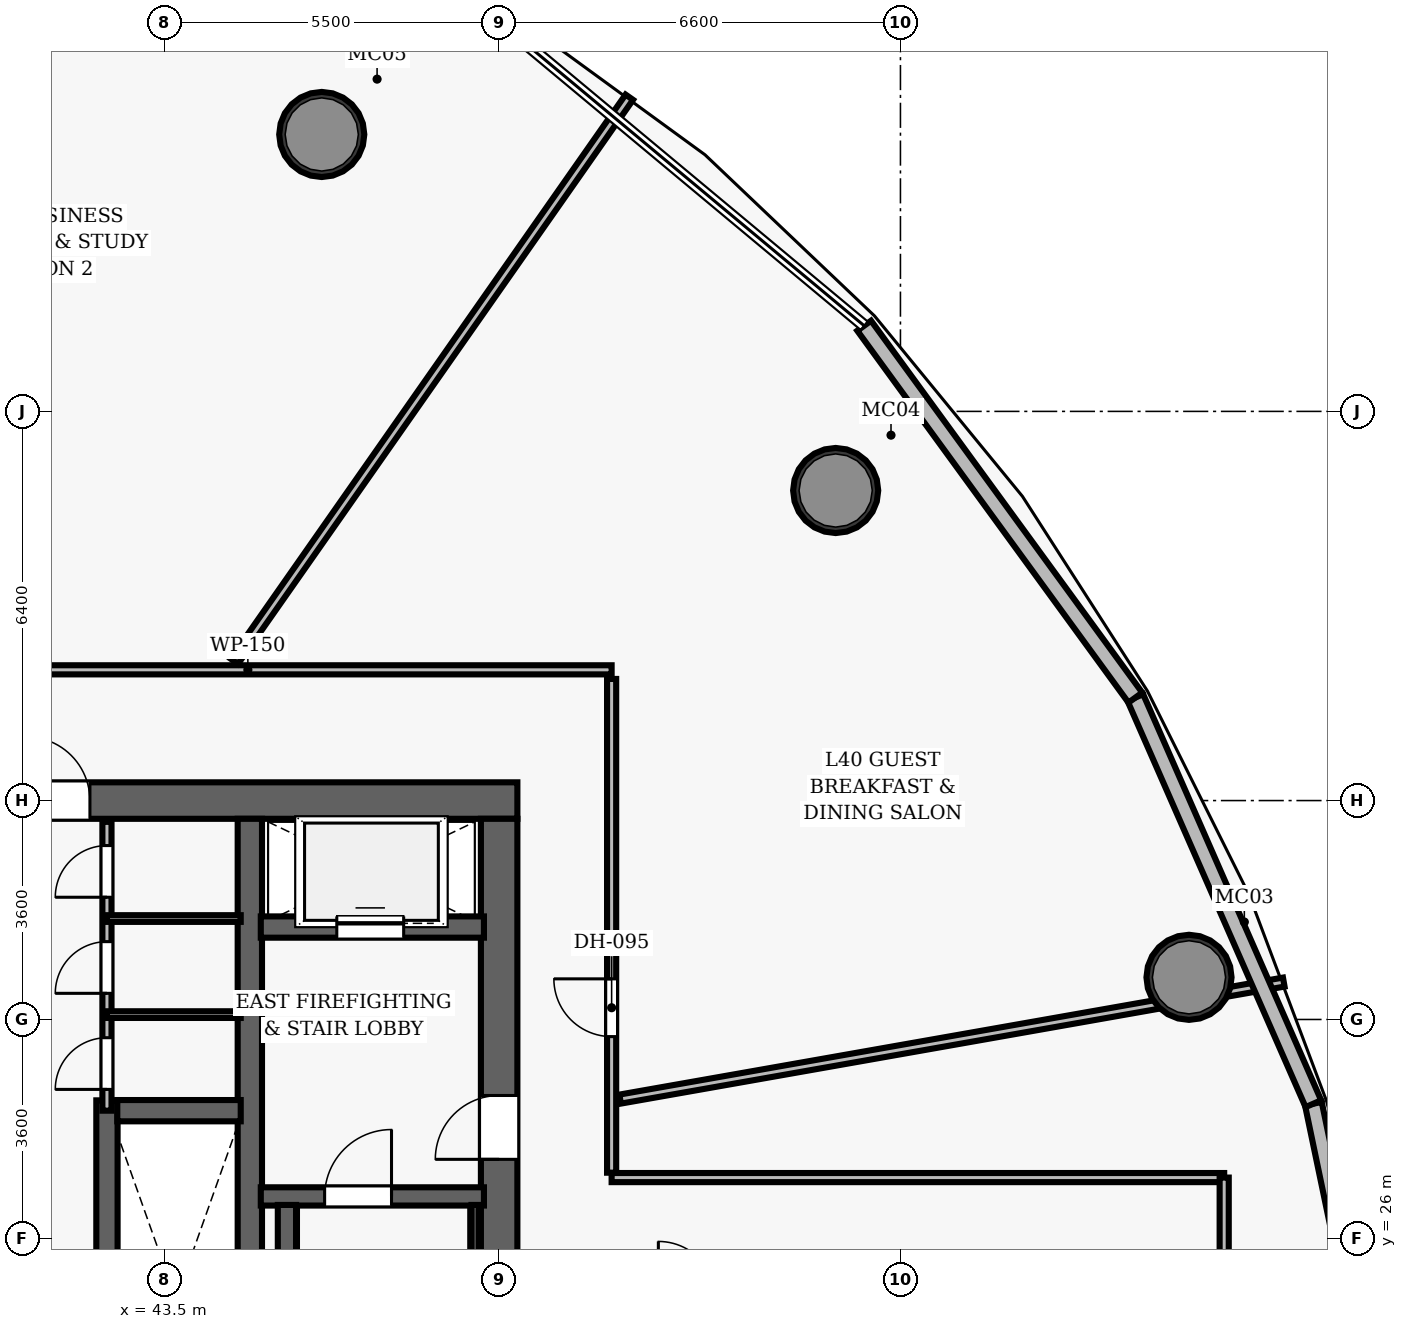
"""IFC4 building model, lengths in metres.
Left out: names, types, materials, properties, quantities, classifications, styles, units other than length and angle.
Written with IfcOpenShell. Run it as: python <this file> out.ifc"""

import sys

from ifc_helpers import new_model, si_unit, direction, frame, frame_2d, origin, origin_2d, place, context, subcontext, project, spatial, rectangle, hollow_circle, extrude, element, fill, save


model = new_model("IFC4")
c1 = context("Model", 3, precision=1e-05, world=origin(), true_north=direction((0.0, 1.0)))
c2 = subcontext(c1, "Body", "Model", "MODEL_VIEW")
j1 = project(units=[si_unit("LENGTHUNIT", "METRE"), si_unit("PLANEANGLEUNIT", "RADIAN")], contexts=[c1])
p1 = place(None, origin())
s1 = spatial("IfcSite", under=j1, at=p1, CompositionType="ELEMENT")
p2 = place(p1, origin())
s2 = spatial("IfcBuilding", under=s1, at=p2, CompositionType="ELEMENT")
p3 = place(p2, frame((0.0, 0.0, 158.8)))
s3 = spatial("IfcBuildingStorey", under=s2, at=p3, CompositionType="ELEMENT", Elevation=158.8)
p4 = place(p3, frame((26.7, 33.2, 0.0), z_axis=(0.0, 0.0, 1.0), x_axis=(1.0, 0.0, 0.0)))
e1 = element("IfcWall", 1, at=p4, inside=s3, PredefinedType="SHEAR", context=c2, shape_type="SweptSolid", body=[
    extrude(rectangle(XDim=22.6, YDim=0.6, at=frame_2d((11.3, 0.0))), origin(), (0.0, 0.0, 1.0), 3.5),
])
p5 = place(p4, frame((4.62, 0.0, 0.0)))
e2 = element("IfcOpeningElement", 2, at=p5, cuts=e1, PredefinedType="OPENING", context=c2, shape_type="SweptSolid", body=[
    extrude(rectangle(XDim=1.05, YDim=2.15, at=frame_2d((0.525, 1.075))), frame((0.0, 0.31, 0.0), z_axis=(0.0, -1.0, 0.0), x_axis=(1.0, 0.0, 0.0)), (0.0, 0.0, 1.0), 0.62),
])
p6 = place(p4, frame((14.52, 0.0, 0.0)))
e3 = element("IfcOpeningElement", 3, at=p6, cuts=e1, PredefinedType="OPENING", context=c2, shape_type="SweptSolid", body=[
    extrude(rectangle(XDim=1.05, YDim=2.15, at=frame_2d((0.525, 1.075))), frame((0.0, 0.31, 0.0), z_axis=(0.0, -1.0, 0.0), x_axis=(1.0, 0.0, 0.0)), (0.0, 0.0, 1.0), 0.62),
])
p7 = place(p3, frame((49.0, 19.1, 0.0), z_axis=(0.0, 0.0, 1.0), x_axis=(0.0, 1.0, 0.0)))
e4 = element("IfcWall", 4, at=p7, inside=s3, PredefinedType="SHEAR", context=c2, shape_type="SweptSolid", body=[
    extrude(rectangle(XDim=13.8, YDim=0.6, at=frame_2d((6.9, 0.0))), origin(), (0.0, 0.0, 1.0), 3.5),
])
p8 = place(p7, frame((8.2, 0.0, 0.0)))
e5 = element("IfcOpeningElement", 5, at=p8, cuts=e4, PredefinedType="OPENING", context=c2, shape_type="SweptSolid", body=[
    extrude(rectangle(XDim=1.05, YDim=2.15, at=frame_2d((0.525, 1.075))), frame((0.0, 0.31, 0.0), z_axis=(0.0, -1.0, 0.0), x_axis=(1.0, 0.0, 0.0)), (0.0, 0.0, 1.0), 0.62),
])
p9 = place(p3, frame((44.9, 19.1, 0.0), z_axis=(0.0, 0.0, 1.0), x_axis=(0.0, 1.0, 0.0)))
e6 = element("IfcWall", 6, at=p9, inside=s3, PredefinedType="SHEAR", context=c2, shape_type="SweptSolid", body=[
    extrude(rectangle(XDim=13.8, YDim=0.4, at=frame_2d((6.9, 0.0))), origin(), (0.0, 0.0, 1.0), 3.5),
])
for number, where, z_axis, x_axis in (
    (7, (60.346, 30.293, 0.0), (0.0, 0.0, 1.0), (1.0, 0.0, 0.0)),
    (8, (54.535, 38.299, 0.0), (0.0, 0.0, 1.0), (1.0, 0.0, 0.0)),
    (9, (46.083, 44.154, 0.0), (0.0, 0.0, 1.0), (1.0, 0.0, 0.0)),
):
    element("IfcColumn", number, at=place(p3, frame(where, z_axis=z_axis, x_axis=x_axis)), inside=s3, PredefinedType="COLUMN", context=c2, shape_type="SweptSolid", body=[
        extrude(hollow_circle(Radius=0.7, WallThickness=0.055, at=origin_2d()), origin(), (0.0, 0.0, 1.0), 3.5),
    ])
p10 = place(p3, frame((45.08, 26.69, 0.0), z_axis=(0.0, 0.0, 1.0), x_axis=(1.0, 0.0, 0.0)))
e10 = element("IfcWall", 10, at=p10, inside=s3, PredefinedType="SHEAR", context=c2, shape_type="SweptSolid", body=[
    extrude(rectangle(XDim=3.67, YDim=0.3, at=frame_2d((1.835, 0.0))), origin(), (0.0, 0.0, 1.0), 3.5),
])
p11 = place(p10, frame((1.05, 0.0, 0.0)))
e11 = element("IfcOpeningElement", 11, at=p11, cuts=e10, PredefinedType="OPENING", context=c2, shape_type="SweptSolid", body=[
    extrude(rectangle(XDim=1.1, YDim=2.15, at=frame_2d((0.55, 1.075))), frame((0.0, 0.16, 0.0), z_axis=(0.0, -1.0, 0.0), x_axis=(1.0, 0.0, 0.0)), (0.0, 0.0, 1.0), 0.32),
])
p12 = place(p3, frame((45.51, 19.05, 0.0), z_axis=(0.0, 0.0, 1.0), x_axis=(0.0, 1.0, 0.0)))
e12 = element("IfcWall", 12, at=p12, inside=s3, PredefinedType="SHEAR", context=c2, shape_type="SweptSolid", body=[
    extrude(rectangle(XDim=7.5, YDim=0.3, at=frame_2d((3.75, 0.0))), origin(), (0.0, 0.0, 1.0), 3.5),
])
p13 = place(p3, frame((48.605, 19.1, 0.0), z_axis=(0.0, 0.0, 1.0), x_axis=(0.0, 1.0, 0.0)))
e13 = element("IfcWall", 13, at=p13, inside=s3, PredefinedType="SHEAR", context=c2, shape_type="SweptSolid", body=[
    extrude(rectangle(XDim=7.45, YDim=0.12, at=frame_2d((3.725, 0.0))), origin(), (0.0, 0.0, 1.0), 3.5),
])
p14 = place(p3, frame((45.08, 31.12, 0.0), z_axis=(0.0, 0.0, 1.0), x_axis=(1.0, 0.0, 0.0)))
e14 = element("IfcWall", 14, at=p14, inside=s3, PredefinedType="SHEAR", context=c2, shape_type="SweptSolid", body=[
    extrude(rectangle(XDim=3.67, YDim=0.35, at=frame_2d((1.835, 0.0))), origin(), (0.0, 0.0, 1.0), 2.675),
])
p15 = place(p14, frame((1.25, 0.0, 0.0)))
e15 = element("IfcOpeningElement", 15, at=p15, cuts=e14, PredefinedType="OPENING", context=c2, shape_type="SweptSolid", body=[
    extrude(rectangle(XDim=1.1, YDim=2.15, at=frame_2d((0.55, 1.075))), frame((0.0, 0.185, 0.0), z_axis=(0.0, -1.0, 0.0), x_axis=(1.0, 0.0, 0.0)), (0.0, 0.0, 1.0), 0.37),
])
p16 = place(p3, frame((42.55, 21.73, 0.0), z_axis=(0.0, 0.0, 1.0), x_axis=(0.0, 1.0, 0.0)))
e16 = element("IfcWall", 16, at=p16, inside=s3, PredefinedType="SHEAR", context=c2, shape_type="SweptSolid", body=[
    extrude(rectangle(XDim=6.54, YDim=0.35, at=frame_2d((3.27, 0.0))), origin(), (0.0, 0.0, 1.0), 2.675),
])
p17 = place(p3, frame((42.72, 28.1, 0.0), z_axis=(0.0, 0.0, 1.0), x_axis=(1.0, 0.0, 0.0)))
e17 = element("IfcWall", 17, at=p17, inside=s3, PredefinedType="SHEAR", context=c2, shape_type="SweptSolid", body=[
    extrude(rectangle(XDim=2.03, YDim=0.35, at=frame_2d((1.015, 0.0))), origin(), (0.0, 0.0, 1.0), 2.675),
])
p18 = place(p3, frame((42.55, 28.1, 0.0), z_axis=(0.0, 0.0, 1.0), x_axis=(0.0, 1.0, 0.0)))
e18 = element("IfcWall", 18, at=p18, inside=s3, PredefinedType="PARTITIONING", context=c2, shape_type="SweptSolid", body=[
    extrude(rectangle(XDim=4.75, YDim=0.15, at=frame_2d((2.375, 0.0))), origin(), (0.0, 0.0, 1.0), 2.675),
])
p19 = place(p18, frame((0.35, 0.0, 0.0)))
e19 = element("IfcOpeningElement", 19, at=p19, cuts=e18, PredefinedType="OPENING", context=c2, shape_type="SweptSolid", body=[
    extrude(rectangle(XDim=0.85, YDim=2.1, at=frame_2d((0.425, 1.05))), frame((0.0, 0.085, 0.0), z_axis=(0.0, -1.0, 0.0), x_axis=(1.0, 0.0, 0.0)), (0.0, 0.0, 1.0), 0.17),
])
p20 = place(p18, frame((1.93, 0.0, 0.0)))
e20 = element("IfcOpeningElement", 20, at=p20, cuts=e18, PredefinedType="OPENING", context=c2, shape_type="SweptSolid", body=[
    extrude(rectangle(XDim=0.85, YDim=2.1, at=frame_2d((0.425, 1.05))), frame((0.0, 0.085, 0.0), z_axis=(0.0, -1.0, 0.0), x_axis=(1.0, 0.0, 0.0)), (0.0, 0.0, 1.0), 0.17),
])
p21 = place(p18, frame((3.51, 0.0, 0.0)))
e21 = element("IfcOpeningElement", 21, at=p21, cuts=e18, PredefinedType="OPENING", context=c2, shape_type="SweptSolid", body=[
    extrude(rectangle(XDim=0.85, YDim=2.1, at=frame_2d((0.425, 1.05))), frame((0.0, 0.085, 0.0), z_axis=(0.0, -1.0, 0.0), x_axis=(1.0, 0.0, 0.0)), (0.0, 0.0, 1.0), 0.17),
])
for number, where, z_axis, x_axis in (
    (22, (42.55, 29.68, 0.0), (0.0, 0.0, 1.0), (1.0, 0.0, 0.0)),
    (23, (42.55, 31.26, 0.0), (0.0, 0.0, 1.0), (1.0, 0.0, 0.0)),
):
    element("IfcWall", number, at=place(p3, frame(where, z_axis=z_axis, x_axis=x_axis)), inside=s3, PredefinedType="PARTITIONING", context=c2, shape_type="SweptSolid", body=[
        extrude(rectangle(XDim=2.2, YDim=0.11, at=frame_2d((1.1, 0.0))), origin(), (0.0, 0.0, 1.0), 2.675),
    ])
p22 = place(p3, frame((24.85, 35.35, 0.0), z_axis=(0.0, 0.0, 1.0), x_axis=(1.0, 0.0, 0.0)))
e24 = element("IfcWall", 24, at=p22, inside=s3, PredefinedType="PARTITIONING", context=c2, shape_type="SweptSolid", body=[
    extrude(rectangle(XDim=26.0, YDim=0.15, at=frame_2d((13.0, 0.0))), origin(), (0.0, 0.0, 1.0), 2.675),
])
p23 = place(p22, frame((12.935, 0.0, 0.0)))
e25 = element("IfcOpeningElement", 25, at=p23, cuts=e24, PredefinedType="OPENING", context=c2, shape_type="SweptSolid", body=[
    extrude(rectangle(XDim=0.95, YDim=2.15, at=frame_2d((0.475, 1.075))), frame((0.0, 0.085, 0.0), z_axis=(0.0, -1.0, 0.0), x_axis=(1.0, 0.0, 0.0)), (0.0, 0.0, 1.0), 0.17),
])
p24 = place(p22, frame((8.357, 0.0, 0.0)))
e26 = element("IfcOpeningElement", 26, at=p24, cuts=e24, PredefinedType="OPENING", context=c2, shape_type="SweptSolid", body=[
    extrude(rectangle(XDim=0.95, YDim=2.15, at=frame_2d((0.475, 1.075))), frame((0.0, 0.085, 0.0), z_axis=(0.0, -1.0, 0.0), x_axis=(1.0, 0.0, 0.0)), (0.0, 0.0, 1.0), 0.17),
])
p25 = place(p3, frame((50.85, 27.08, 0.0), z_axis=(0.0, 0.0, 1.0), x_axis=(0.0, 1.0, 0.0)))
e27 = element("IfcWall", 27, at=p25, inside=s3, PredefinedType="PARTITIONING", context=c2, shape_type="SweptSolid", body=[
    extrude(rectangle(XDim=8.12, YDim=0.15, at=frame_2d((4.06, 0.0))), origin(), (0.0, 0.0, 1.0), 2.675),
])
p26 = place(p25, frame((2.238, 0.0, 0.0)))
e28 = element("IfcOpeningElement", 28, at=p26, cuts=e27, PredefinedType="OPENING", context=c2, shape_type="SweptSolid", body=[
    extrude(rectangle(XDim=0.95, YDim=2.15, at=frame_2d((0.475, 1.075))), frame((0.0, 0.085, 0.0), z_axis=(0.0, -1.0, 0.0), x_axis=(1.0, 0.0, 0.0)), (0.0, 0.0, 1.0), 0.17),
])
p27 = place(p3, frame((50.85, 27.0, 0.0), z_axis=(0.0, 0.0, 1.0), x_axis=(1.0, 0.0, 0.0)))
e29 = element("IfcWall", 29, at=p27, inside=s3, PredefinedType="PARTITIONING", context=c2, shape_type="SweptSolid", body=[
    extrude(rectangle(XDim=10.074, YDim=0.15, at=frame_2d((5.037, 0.0))), origin(), (0.0, 0.0, 1.0), 2.675),
])
p28 = place(p3, frame((60.925, 25.0, 0.0), z_axis=(0.0, 0.0, 1.0), x_axis=(0.0, 1.0, 0.0)))
e30 = element("IfcWall", 30, at=p28, inside=s3, PredefinedType="PARTITIONING", context=c2, shape_type="SweptSolid", body=[
    extrude(rectangle(XDim=2.0, YDim=0.15, at=frame_2d((1.0, 0.0))), origin(), (0.0, 0.0, 1.0), 2.675),
])
p29 = place(p3, frame((50.99, 28.291, 0.0), z_axis=(0.0, 0.0, 1.0), x_axis=(0.984807278352, 0.173650869576, 0.0)))
e31 = element("IfcWall", 31, at=p29, inside=s3, PredefinedType="PARTITIONING", context=c2, shape_type="SweptSolid", body=[
    extrude(rectangle(XDim=11.083, YDim=0.15, at=frame_2d((5.542, 0.0))), origin(), (0.0, 0.0, 1.0), 2.675),
])
p30 = place(p3, frame((44.645, 35.49, 0.0), z_axis=(0.0, 0.0, 1.0), x_axis=(0.573578078788, 0.81915089424, 0.0)))
e32 = element("IfcWall", 32, at=p30, inside=s3, PredefinedType="PARTITIONING", context=c2, shape_type="SweptSolid", body=[
    extrude(rectangle(XDim=11.325, YDim=0.15, at=frame_2d((5.663, 0.0))), origin(), (0.0, 0.0, 1.0), 2.675),
])
p31 = place(p3, frame((62.391, 28.215, 0.0), z_axis=(0.0, 0.0, 1.0), x_axis=(0.20428043062, -0.978912409598, 0.0)))
e33 = element("IfcWall", 33, at=p31, inside=s3, PredefinedType="SOLIDWALL", context=c2, shape_type="SweptSolid", body=[
    extrude(rectangle(XDim=6.665, YDim=0.28, at=frame_2d((3.333, 0.0))), origin(), (0.0, 0.0, 1.0), 3.26),
])
p32 = place(p3, frame((59.463, 34.893, 0.0), z_axis=(0.0, 0.0, 1.0), x_axis=(0.401510744886, -0.915854312509, 0.0)))
e34 = element("IfcWall", 34, at=p32, inside=s3, PredefinedType="SOLIDWALL", context=c2, shape_type="SweptSolid", body=[
    extrude(rectangle(XDim=7.292, YDim=0.28, at=frame_2d((3.646, 0.0))), origin(), (0.0, 0.0, 1.0), 3.26),
])
p33 = place(p3, frame((55.003, 41.009, 0.0), z_axis=(0.0, 0.0, 1.0), x_axis=(0.589222169275, -0.80797106089, 0.0)))
e35 = element("IfcWall", 35, at=p33, inside=s3, PredefinedType="SOLIDWALL", context=c2, shape_type="SweptSolid", body=[
    extrude(rectangle(XDim=7.569, YDim=0.28, at=frame_2d((3.785, 0.0))), origin(), (0.0, 0.0, 1.0), 3.26),
])
p34 = place(p11, origin())
e36 = element("IfcDoor", 36, at=p34, inside=s3, OperationType="SINGLE_SWING_RIGHT", PredefinedType="DOOR", context=c2, shape_type="SweptSolid", body=[
    extrude(rectangle(XDim=1.1, YDim=2.15, at=frame_2d((0.55, 1.075))), frame((0.0, 0.025, 0.0), z_axis=(0.0, -1.0, 0.0), x_axis=(1.0, 0.0, 0.0)), (0.0, 0.0, 1.0), 0.05),
])
fill(e11, e36)
p35 = place(p8, origin())
e37 = element("IfcDoor", 37, at=p35, inside=s3, OperationType="SINGLE_SWING_LEFT", PredefinedType="DOOR", context=c2, shape_type="SweptSolid", body=[
    extrude(rectangle(XDim=1.05, YDim=2.15, at=frame_2d((0.525, 1.075))), frame((0.0, 0.025, 0.0), z_axis=(0.0, -1.0, 0.0), x_axis=(1.0, 0.0, 0.0)), (0.0, 0.0, 1.0), 0.05),
])
fill(e5, e37)
p36 = place(p6, origin())
e38 = element("IfcDoor", 38, at=p36, inside=s3, OperationType="SINGLE_SWING_LEFT", PredefinedType="DOOR", context=c2, shape_type="SweptSolid", body=[
    extrude(rectangle(XDim=1.05, YDim=2.15, at=frame_2d((0.525, 1.075))), frame((0.0, 0.025, 0.0), z_axis=(0.0, -1.0, 0.0), x_axis=(1.0, 0.0, 0.0)), (0.0, 0.0, 1.0), 0.05),
])
fill(e3, e38)
p37 = place(p19, origin())
e39 = element("IfcDoor", 39, at=p37, inside=s3, OperationType="SINGLE_SWING_LEFT", PredefinedType="DOOR", context=c2, shape_type="SweptSolid", body=[
    extrude(rectangle(XDim=0.85, YDim=2.1, at=frame_2d((0.425, 1.05))), frame((0.0, 0.025, 0.0), z_axis=(0.0, -1.0, 0.0), x_axis=(1.0, 0.0, 0.0)), (0.0, 0.0, 1.0), 0.05),
])
fill(e19, e39)
p38 = place(p20, origin())
e40 = element("IfcDoor", 40, at=p38, inside=s3, OperationType="SINGLE_SWING_LEFT", PredefinedType="DOOR", context=c2, shape_type="SweptSolid", body=[
    extrude(rectangle(XDim=0.85, YDim=2.1, at=frame_2d((0.425, 1.05))), frame((0.0, 0.025, 0.0), z_axis=(0.0, -1.0, 0.0), x_axis=(1.0, 0.0, 0.0)), (0.0, 0.0, 1.0), 0.05),
])
fill(e20, e40)
p39 = place(p21, origin())
e41 = element("IfcDoor", 41, at=p39, inside=s3, OperationType="SINGLE_SWING_LEFT", PredefinedType="DOOR", context=c2, shape_type="SweptSolid", body=[
    extrude(rectangle(XDim=0.85, YDim=2.1, at=frame_2d((0.425, 1.05))), frame((0.0, 0.025, 0.0), z_axis=(0.0, -1.0, 0.0), x_axis=(1.0, 0.0, 0.0)), (0.0, 0.0, 1.0), 0.05),
])
fill(e21, e41)
p40 = place(p26, origin())
e42 = element("IfcDoor", 42, at=p40, inside=s3, OperationType="SINGLE_SWING_RIGHT", PredefinedType="DOOR", context=c2, shape_type="SweptSolid", body=[
    extrude(rectangle(XDim=0.95, YDim=2.15, at=frame_2d((0.475, 1.075))), frame((0.0, 0.025, 0.0), z_axis=(0.0, -1.0, 0.0), x_axis=(1.0, 0.0, 0.0)), (0.0, 0.0, 1.0), 0.05),
])
fill(e28, e42)
p41 = place(p15, origin())
e43 = element("IfcDoor", 43, at=p41, inside=s3, OperationType="SLIDING_TO_LEFT", PredefinedType="DOOR", context=c2, shape_type="SweptSolid", body=[
    extrude(rectangle(XDim=1.1, YDim=2.15, at=frame_2d((0.55, 1.075))), frame((0.0, 0.025, 0.0), z_axis=(0.0, -1.0, 0.0), x_axis=(1.0, 0.0, 0.0)), (0.0, 0.0, 1.0), 0.05),
])
fill(e15, e43)
save(model, sys.argv[1])
